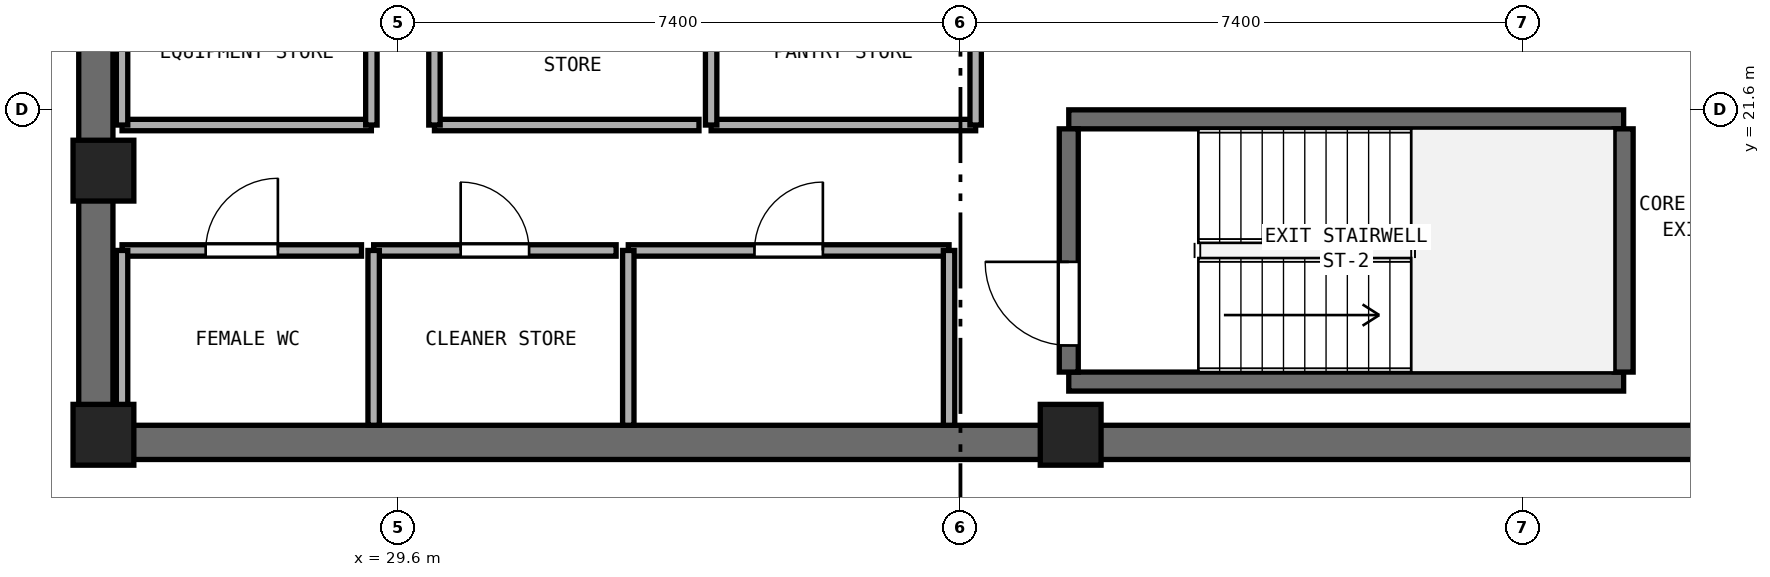
"""IFC4 building model, lengths in metres.
Left out: names, types, materials, properties, quantities, classifications, styles, units other than length and angle.
Written with IfcOpenShell. Run it as: python <this file> out.ifc"""

import sys

from ifc_helpers import new_model, si_unit, direction, frame, frame_2d, origin, origin_2d, place, context, subcontext, project, spatial, rectangle, extrude, element, fill, save


model = new_model("IFC4")
c1 = context("Model", 3, precision=1e-05, world=origin(), true_north=direction((0.0, 1.0)))
c2 = subcontext(c1, "Body", "Model", "MODEL_VIEW")
j1 = project(units=[si_unit("LENGTHUNIT", "METRE"), si_unit("PLANEANGLEUNIT", "RADIAN")], contexts=[c1])
p1 = place(None, origin())
s1 = spatial("IfcSite", under=j1, at=p1, CompositionType="ELEMENT")
p2 = place(p1, origin())
s2 = spatial("IfcBuilding", under=s1, at=p2, CompositionType="ELEMENT")
p3 = place(p2, frame((0.0, 0.0, 240.2)))
s3 = spatial("IfcBuildingStorey", under=s2, at=p3, CompositionType="ELEMENT", Elevation=240.2)
p4 = place(p3, frame((25.4, 17.225, 0.0), z_axis=(0.0, 0.0, 1.0), x_axis=(1.0, 0.0, 0.0)))
e1 = element("IfcWall", 1, at=p4, inside=s3, PredefinedType="SHEAR", context=c2, shape_type="SweptSolid", body=[
    extrude(rectangle(XDim=23.2, YDim=0.45, at=frame_2d((11.6, 0.0))), origin(), (0.0, 0.0, 1.0), 3.51),
])
p5 = place(p3, frame((25.625, 17.45, 0.0), z_axis=(0.0, 0.0, 1.0), x_axis=(0.0, 1.0, 0.0)))
e2 = element("IfcWall", 2, at=p5, inside=s3, PredefinedType="SHEAR", context=c2, shape_type="SweptSolid", body=[
    extrude(rectangle(XDim=15.5, YDim=0.45, at=frame_2d((7.75, 0.0))), origin(), (0.0, 0.0, 1.0), 3.51),
])
p6 = place(p5, frame((7.0, 0.0, 0.0)))
e3 = element("IfcOpeningElement", 3, at=p6, cuts=e2, PredefinedType="OPENING", context=c2, shape_type="SweptSolid", body=[
    extrude(rectangle(XDim=1.5, YDim=2.15, at=frame_2d((0.75, 1.075))), frame((0.0, 0.235, 0.0), z_axis=(0.0, -1.0, 0.0), x_axis=(1.0, 0.0, 0.0)), (0.0, 0.0, 1.0), 0.47),
])
for number, where, z_axis, x_axis in (
    (4, (25.725, 17.325, 0.0), (0.0, 0.0, 1.0), (1.0, 0.0, 0.0)),
    (5, (38.45, 17.325, 0.0), (0.0, 0.0, 1.0), (1.0, 0.0, 0.0)),
    (6, (25.725, 20.8, 0.0), (0.0, 0.0, 1.0), (1.0, 0.0, 0.0)),
):
    element("IfcColumn", number, at=place(p3, frame(where, z_axis=z_axis, x_axis=x_axis)), inside=s3, PredefinedType="PILASTER", context=c2, shape_type="SweptSolid", body=[
        extrude(rectangle(XDim=0.8, YDim=0.8, at=origin_2d()), origin(), (0.0, 0.0, 1.0), 3.8),
    ])
for number, where, z_axis, x_axis in (
    (7, (38.425, 18.025, 0.0), (0.0, 0.0, 1.0), (1.0, 0.0, 0.0)),
    (8, (38.425, 21.475, 0.0), (0.0, 0.0, 1.0), (1.0, 0.0, 0.0)),
):
    element("IfcWall", number, at=place(p3, frame(where, z_axis=z_axis, x_axis=x_axis)), inside=s3, PredefinedType="SHEAR", context=c2, shape_type="SweptSolid", body=[
        extrude(rectangle(XDim=7.3, YDim=0.25, at=frame_2d((3.65, 0.0))), origin(), (0.0, 0.0, 1.0), 3.51),
    ])
p7 = place(p3, frame((38.425, 18.15, 0.0), z_axis=(0.0, 0.0, 1.0), x_axis=(0.0, 1.0, 0.0)))
e9 = element("IfcWall", 9, at=p7, inside=s3, PredefinedType="SHEAR", context=c2, shape_type="SweptSolid", body=[
    extrude(rectangle(XDim=3.2, YDim=0.25, at=frame_2d((1.6, 0.0))), origin(), (0.0, 0.0, 1.0), 3.51),
])
p8 = place(p7, frame((0.35, 0.0, 0.0)))
e10 = element("IfcOpeningElement", 10, at=p8, cuts=e9, PredefinedType="OPENING", context=c2, shape_type="SweptSolid", body=[
    extrude(rectangle(XDim=1.1, YDim=2.15, at=frame_2d((0.55, 1.075))), frame((0.0, 0.135, 0.0), z_axis=(0.0, -1.0, 0.0), x_axis=(1.0, 0.0, 0.0)), (0.0, 0.0, 1.0), 0.27),
])
p9 = place(p3, frame((45.725, 18.15, 0.0), z_axis=(0.0, 0.0, 1.0), x_axis=(0.0, 1.0, 0.0)))
e11 = element("IfcWall", 11, at=p9, inside=s3, PredefinedType="SHEAR", context=c2, shape_type="SweptSolid", body=[
    extrude(rectangle(XDim=3.2, YDim=0.25, at=frame_2d((1.6, 0.0))), origin(), (0.0, 0.0, 1.0), 3.51),
])
p10 = place(p3, frame((25.97, 19.75, 0.0), z_axis=(0.0, 0.0, 1.0), x_axis=(1.0, 0.0, 0.0)))
e12 = element("IfcWall", 12, at=p10, inside=s3, PredefinedType="PARTITIONING", context=c2, shape_type="SweptSolid", body=[
    extrude(rectangle(XDim=3.15, YDim=0.15, at=frame_2d((1.575, 0.0))), origin(), (0.0, 0.0, 1.0), 3.51),
])
p11 = place(p10, frame((1.1, 0.0, 0.0)))
e13 = element("IfcOpeningElement", 13, at=p11, cuts=e12, PredefinedType="OPENING", context=c2, shape_type="SweptSolid", body=[
    extrude(rectangle(XDim=0.95, YDim=2.1, at=frame_2d((0.475, 1.05))), frame((0.0, 0.085, 0.0), z_axis=(0.0, -1.0, 0.0), x_axis=(1.0, 0.0, 0.0)), (0.0, 0.0, 1.0), 0.17),
])
p12 = place(p3, frame((25.97, 17.45, 0.0), z_axis=(0.0, 0.0, 1.0), x_axis=(0.0, 1.0, 0.0)))
e14 = element("IfcWall", 14, at=p12, inside=s3, PredefinedType="PARTITIONING", context=c2, shape_type="SweptSolid", body=[
    extrude(rectangle(XDim=2.3, YDim=0.15, at=frame_2d((1.15, 0.0))), origin(), (0.0, 0.0, 1.0), 2.61),
])
p13 = place(p3, frame((29.28, 19.75, 0.0), z_axis=(0.0, 0.0, 1.0), x_axis=(1.0, 0.0, 0.0)))
e15 = element("IfcWall", 15, at=p13, inside=s3, PredefinedType="PARTITIONING", context=c2, shape_type="SweptSolid", body=[
    extrude(rectangle(XDim=3.19, YDim=0.15, at=frame_2d((1.595, 0.0))), origin(), (0.0, 0.0, 1.0), 3.51),
])
p14 = place(p13, frame((1.145, 0.0, 0.0)))
e16 = element("IfcOpeningElement", 16, at=p14, cuts=e15, PredefinedType="OPENING", context=c2, shape_type="SweptSolid", body=[
    extrude(rectangle(XDim=0.9, YDim=2.1, at=frame_2d((0.45, 1.05))), frame((0.0, 0.085, 0.0), z_axis=(0.0, -1.0, 0.0), x_axis=(1.0, 0.0, 0.0)), (0.0, 0.0, 1.0), 0.17),
])
p15 = place(p3, frame((29.28, 17.45, 0.0), z_axis=(0.0, 0.0, 1.0), x_axis=(0.0, 1.0, 0.0)))
e17 = element("IfcWall", 17, at=p15, inside=s3, PredefinedType="PARTITIONING", context=c2, shape_type="SweptSolid", body=[
    extrude(rectangle(XDim=2.3, YDim=0.15, at=frame_2d((1.15, 0.0))), origin(), (0.0, 0.0, 1.0), 3.51),
])
p16 = place(p3, frame((32.63, 19.75, 0.0), z_axis=(0.0, 0.0, 1.0), x_axis=(1.0, 0.0, 0.0)))
e18 = element("IfcWall", 18, at=p16, inside=s3, PredefinedType="PARTITIONING", context=c2, shape_type="SweptSolid", body=[
    extrude(rectangle(XDim=4.22, YDim=0.15, at=frame_2d((2.11, 0.0))), origin(), (0.0, 0.0, 1.0), 3.51),
])
p17 = place(p16, frame((1.66, 0.0, 0.0)))
e19 = element("IfcOpeningElement", 19, at=p17, cuts=e18, PredefinedType="OPENING", context=c2, shape_type="SweptSolid", body=[
    extrude(rectangle(XDim=0.9, YDim=2.1, at=frame_2d((0.45, 1.05))), frame((0.0, 0.085, 0.0), z_axis=(0.0, -1.0, 0.0), x_axis=(1.0, 0.0, 0.0)), (0.0, 0.0, 1.0), 0.17),
])
for number, where, z_axis, x_axis in (
    (20, (32.63, 17.45, 0.0), (0.0, 0.0, 1.0), (0.0, 1.0, 0.0)),
    (21, (36.85, 17.45, 0.0), (0.0, 0.0, 1.0), (0.0, 1.0, 0.0)),
):
    element("IfcWall", number, at=place(p3, frame(where, z_axis=z_axis, x_axis=x_axis)), inside=s3, PredefinedType="PARTITIONING", context=c2, shape_type="SweptSolid", body=[
        extrude(rectangle(XDim=2.3, YDim=0.15, at=frame_2d((1.15, 0.0))), origin(), (0.0, 0.0, 1.0), 3.51),
    ])
p18 = place(p3, frame((25.97, 21.4, 0.0), z_axis=(0.0, 0.0, 1.0), x_axis=(1.0, 0.0, 0.0)))
e22 = element("IfcWall", 22, at=p18, inside=s3, PredefinedType="PARTITIONING", context=c2, shape_type="SweptSolid", body=[
    extrude(rectangle(XDim=3.28, YDim=0.15, at=frame_2d((1.64, 0.0))), origin(), (0.0, 0.0, 1.0), 3.51),
])
p19 = place(p3, frame((25.97, 21.4, 0.0), z_axis=(0.0, 0.0, 1.0), x_axis=(0.0, 1.0, 0.0)))
e23 = element("IfcWall", 23, at=p19, inside=s3, PredefinedType="PARTITIONING", context=c2, shape_type="SweptSolid", body=[
    extrude(rectangle(XDim=2.2, YDim=0.15, at=frame_2d((1.1, 0.0))), origin(), (0.0, 0.0, 1.0), 2.61),
])
p20 = place(p3, frame((29.25, 21.4, 0.0), z_axis=(0.0, 0.0, 1.0), x_axis=(0.0, 1.0, 0.0)))
e24 = element("IfcWall", 24, at=p20, inside=s3, PredefinedType="PARTITIONING", context=c2, shape_type="SweptSolid", body=[
    extrude(rectangle(XDim=2.2, YDim=0.15, at=frame_2d((1.1, 0.0))), origin(), (0.0, 0.0, 1.0), 3.51),
])
p21 = place(p3, frame((30.08, 21.4, 0.0), z_axis=(0.0, 0.0, 1.0), x_axis=(1.0, 0.0, 0.0)))
e25 = element("IfcWall", 25, at=p21, inside=s3, PredefinedType="PARTITIONING", context=c2, shape_type="SweptSolid", body=[
    extrude(rectangle(XDim=3.48, YDim=0.15, at=frame_2d((1.74, 0.0))), origin(), (0.0, 0.0, 1.0), 3.51),
])
p22 = place(p3, frame((30.08, 21.4, 0.0), z_axis=(0.0, 0.0, 1.0), x_axis=(0.0, 1.0, 0.0)))
e26 = element("IfcWall", 26, at=p22, inside=s3, PredefinedType="PARTITIONING", context=c2, shape_type="SweptSolid", body=[
    extrude(rectangle(XDim=2.2, YDim=0.15, at=frame_2d((1.1, 0.0))), origin(), (0.0, 0.0, 1.0), 3.51),
])
p23 = place(p3, frame((33.72, 21.4, 0.0), z_axis=(0.0, 0.0, 1.0), x_axis=(1.0, 0.0, 0.0)))
e27 = element("IfcWall", 27, at=p23, inside=s3, PredefinedType="PARTITIONING", context=c2, shape_type="SweptSolid", body=[
    extrude(rectangle(XDim=3.48, YDim=0.15, at=frame_2d((1.74, 0.0))), origin(), (0.0, 0.0, 1.0), 3.51),
])
for number, where, z_axis, x_axis in (
    (28, (33.72, 21.4, 0.0), (0.0, 0.0, 1.0), (0.0, 1.0, 0.0)),
    (29, (37.2, 21.4, 0.0), (0.0, 0.0, 1.0), (0.0, 1.0, 0.0)),
):
    element("IfcWall", number, at=place(p3, frame(where, z_axis=z_axis, x_axis=x_axis)), inside=s3, PredefinedType="PARTITIONING", context=c2, shape_type="SweptSolid", body=[
        extrude(rectangle(XDim=2.2, YDim=0.15, at=frame_2d((1.1, 0.0))), origin(), (0.0, 0.0, 1.0), 3.51),
    ])
p24 = place(p8, origin())
e30 = element("IfcDoor", 30, at=p24, inside=s3, OperationType="SINGLE_SWING_RIGHT", PredefinedType="DOOR", context=c2, shape_type="SweptSolid", body=[
    extrude(rectangle(XDim=1.1, YDim=2.15, at=frame_2d((0.55, 1.075))), frame((0.0, 0.025, 0.0), z_axis=(0.0, -1.0, 0.0), x_axis=(1.0, 0.0, 0.0)), (0.0, 0.0, 1.0), 0.05),
])
fill(e10, e30)
p25 = place(p11, origin())
e31 = element("IfcDoor", 31, at=p25, inside=s3, OperationType="SINGLE_SWING_RIGHT", PredefinedType="DOOR", context=c2, shape_type="SweptSolid", body=[
    extrude(rectangle(XDim=0.95, YDim=2.1, at=frame_2d((0.475, 1.05))), frame((0.0, 0.025, 0.0), z_axis=(0.0, -1.0, 0.0), x_axis=(1.0, 0.0, 0.0)), (0.0, 0.0, 1.0), 0.05),
])
fill(e13, e31)
p26 = place(p14, origin())
e32 = element("IfcDoor", 32, at=p26, inside=s3, OperationType="SINGLE_SWING_LEFT", PredefinedType="DOOR", context=c2, shape_type="SweptSolid", body=[
    extrude(rectangle(XDim=0.9, YDim=2.1, at=frame_2d((0.45, 1.05))), frame((0.0, 0.025, 0.0), z_axis=(0.0, -1.0, 0.0), x_axis=(1.0, 0.0, 0.0)), (0.0, 0.0, 1.0), 0.05),
])
fill(e16, e32)
p27 = place(p17, origin())
e33 = element("IfcDoor", 33, at=p27, inside=s3, OperationType="SINGLE_SWING_RIGHT", PredefinedType="DOOR", context=c2, shape_type="SweptSolid", body=[
    extrude(rectangle(XDim=0.9, YDim=2.1, at=frame_2d((0.45, 1.05))), frame((0.0, 0.025, 0.0), z_axis=(0.0, -1.0, 0.0), x_axis=(1.0, 0.0, 0.0)), (0.0, 0.0, 1.0), 0.05),
])
fill(e19, e33)
save(model, sys.argv[1])
